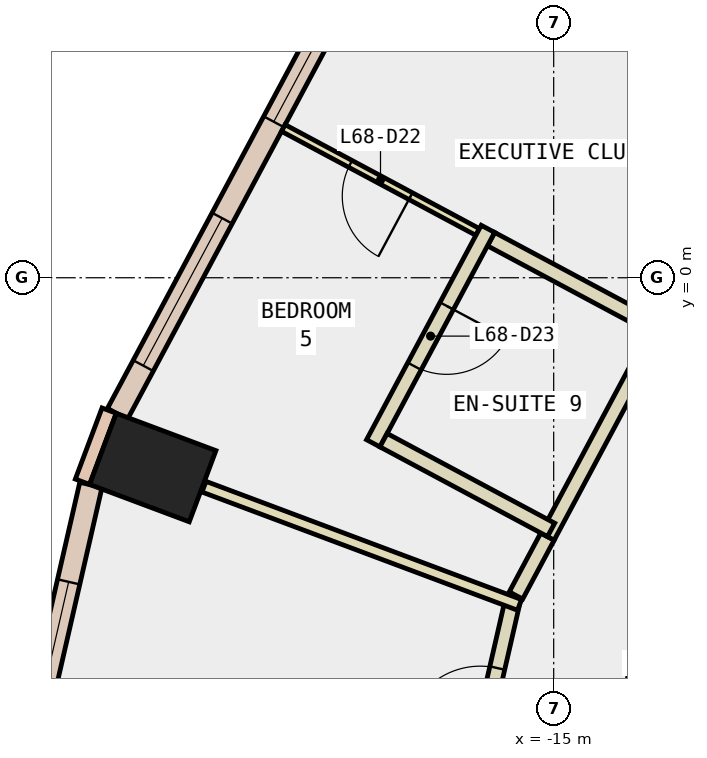
"""IFC4 building model, lengths in metres.
Left out: names, types, materials, properties, quantities, classifications, styles, units other than length and angle.
Written with IfcOpenShell. Run it as: python <this file> out.ifc"""

import sys

from ifc_helpers import new_model, si_unit, direction, frame, frame_2d, origin, origin_2d, place, context, subcontext, project, spatial, rectangle, extrude, element, fill, save


model = new_model("IFC4")
c1 = context("Model", 3, precision=1e-05, world=origin(), true_north=direction((0.0, 1.0)))
c2 = subcontext(c1, "Body", "Model", "MODEL_VIEW")
j1 = project(units=[si_unit("LENGTHUNIT", "METRE"), si_unit("PLANEANGLEUNIT", "RADIAN")], contexts=[c1])
p1 = place(None, origin())
s1 = spatial("IfcSite", under=j1, at=p1, CompositionType="ELEMENT")
p2 = place(p1, origin())
s2 = spatial("IfcBuilding", under=s1, at=p2, CompositionType="ELEMENT")
p3 = place(p2, frame((0.0, 0.0, 293.6)))
s3 = spatial("IfcBuildingStorey", under=s2, at=p3, CompositionType="ELEMENT", Elevation=293.6)
p4 = place(p3, frame((-20.275, -2.497, -0.34), z_axis=(0.0, 0.0, 1.0), x_axis=(0.3507141184, 0.93648257173, 0.0)))
e1 = element("IfcColumn", 1, at=p4, inside=s3, PredefinedType="COLUMN", context=c2, shape_type="SweptSolid", body=[
    extrude(rectangle(XDim=1.0, YDim=1.4, at=origin_2d()), origin(), (0.0, 0.0, 1.0), 3.6),
])
p5 = place(p3, frame((-6.279, -3.625, -0.34), z_axis=(0.0, 0.0, 1.0), x_axis=(-0.866017533419, -0.500013631625, 0.0)))
e2 = element("IfcWall", 2, at=p5, inside=s3, PredefinedType="SHEAR", context=c2, shape_type="SweptSolid", body=[
    extrude(rectangle(XDim=9.0, YDim=0.8, at=frame_2d((4.5, 0.0))), origin(), (0.0, 0.0, 1.0), 3.6),
])
p6 = place(p3, frame((-20.849, -1.748, 0.0), z_axis=(0.0, 0.0, 1.0), x_axis=(-0.350962844851, -0.936389385637, 0.0)))
e3 = element("IfcWall", 3, at=p6, inside=s3, PredefinedType="STANDARD", context=c2, shape_type="SweptSolid", body=[
    extrude(rectangle(XDim=1.0, YDim=0.2, at=frame_2d((0.5, 0.0))), origin(), (0.0, 0.0, 1.0), 3.26),
])
p7 = place(p3, frame((-17.306, 4.626, 0.0), z_axis=(0.0, 0.0, 1.0), x_axis=(-0.471789353675, -0.881711293882, 0.0)))
e4 = element("IfcWall", 4, at=p7, inside=s3, PredefinedType="STANDARD", context=c2, shape_type="SweptSolid", body=[
    extrude(rectangle(XDim=7.277, YDim=0.3, at=frame_2d((3.638, 0.0))), origin(), (0.0, 0.0, 1.0), 3.26),
])
p8 = place(p7, frame((0.719, 0.0, 0.9)))
e5 = element("IfcOpeningElement", 5, at=p8, cuts=e4, PredefinedType="OPENING", context=c2, shape_type="SweptSolid", body=[
    extrude(rectangle(XDim=2.2, YDim=2.0, at=frame_2d((1.1, 1.0))), frame((0.0, 0.16, 0.0), z_axis=(0.0, -1.0, 0.0), x_axis=(1.0, 0.0, 0.0)), (0.0, 0.0, 1.0), 0.32),
])
p9 = place(p7, frame((4.358, 0.0, 0.9)))
e6 = element("IfcOpeningElement", 6, at=p9, cuts=e4, PredefinedType="OPENING", context=c2, shape_type="SweptSolid", body=[
    extrude(rectangle(XDim=2.2, YDim=2.0, at=frame_2d((1.1, 1.0))), frame((0.0, 0.16, 0.0), z_axis=(0.0, -1.0, 0.0), x_axis=(1.0, 0.0, 0.0)), (0.0, 0.0, 1.0), 0.32),
])
p10 = place(p3, frame((-21.089, -2.725, 0.0), z_axis=(0.0, 0.0, 1.0), x_axis=(-0.223448307338, -0.974715781112, 0.0)))
e7 = element("IfcWall", 7, at=p10, inside=s3, PredefinedType="STANDARD", context=c2, shape_type="SweptSolid", body=[
    extrude(rectangle(XDim=4.019, YDim=0.3, at=frame_2d((2.009, 0.0))), origin(), (0.0, 0.0, 1.0), 3.26),
])
p11 = place(p10, frame((1.309, 0.0, 0.9)))
e8 = element("IfcOpeningElement", 8, at=p11, cuts=e7, PredefinedType="OPENING", context=c2, shape_type="SweptSolid", body=[
    extrude(rectangle(XDim=1.4, YDim=2.0, at=frame_2d((0.7, 1.0))), frame((0.0, 0.16, 0.0), z_axis=(0.0, -1.0, 0.0), x_axis=(1.0, 0.0, 0.0)), (0.0, 0.0, 1.0), 0.32),
])
p12 = place(p3, frame((-13.821, -4.808, 0.0), z_axis=(0.0, 0.0, 1.0), x_axis=(-0.223248099856, -0.97476165595, 0.0)))
e9 = element("IfcWall", 9, at=p12, inside=s3, PredefinedType="PARTITIONING", context=c2, shape_type="SweptSolid", body=[
    extrude(rectangle(XDim=2.302, YDim=0.2, at=frame_2d((1.151, 0.0))), origin(), (0.0, 0.0, 1.0), 3.26),
])
p13 = place(p3, frame((-15.496, -4.18, 0.0), z_axis=(0.0, 0.0, 1.0), x_axis=(0.471280380621, 0.881983448167, 0.0)))
e10 = element("IfcWall", 10, at=p13, inside=s3, PredefinedType="PARTITIONING", context=c2, shape_type="SweptSolid", body=[
    extrude(rectangle(XDim=0.879, YDim=0.2, at=frame_2d((0.439, 0.0))), origin(), (0.0, 0.0, 1.0), 3.26),
])
p14 = place(p3, frame((-15.082, -3.405, 0.0), z_axis=(0.0, 0.0, 1.0), x_axis=(0.471719946084, 0.88174842924, 0.0)))
e11 = element("IfcWall", 11, at=p14, inside=s3, PredefinedType="PARTITIONING", context=c2, shape_type="SweptSolid", body=[
    extrude(rectangle(XDim=3.0, YDim=0.2, at=frame_2d((1.5, 0.0))), origin(), (0.0, 0.0, 1.0), 3.26),
])
p15 = place(p3, frame((-16.192, -7.098, 0.0), z_axis=(0.0, 0.0, 1.0), x_axis=(0.22330023395, 0.974749714295, 0.0)))
e12 = element("IfcWall", 12, at=p15, inside=s3, PredefinedType="PARTITIONING", context=c2, shape_type="SweptSolid", body=[
    extrude(rectangle(XDim=2.928, YDim=0.2, at=frame_2d((1.464, 0.0))), origin(), (0.0, 0.0, 1.0), 3.26),
])
p16 = place(p15, frame((1.014, 0.0, 0.0)))
e13 = element("IfcOpeningElement", 13, at=p16, cuts=e12, PredefinedType="OPENING", context=c2, shape_type="SweptSolid", body=[
    extrude(rectangle(XDim=1.0, YDim=2.1, at=frame_2d((0.5, 1.05))), frame((0.0, 0.11, 0.0), z_axis=(0.0, -1.0, 0.0), x_axis=(1.0, 0.0, 0.0)), (0.0, 0.0, 1.0), 0.22),
])
p17 = place(p3, frame((-12.045, 2.272, 0.0), z_axis=(0.0, 0.0, 1.0), x_axis=(-0.873982340973, 0.485957680943, 0.0)))
e14 = element("IfcWall", 14, at=p17, inside=s3, PredefinedType="PARTITIONING", context=c2, shape_type="SweptSolid", body=[
    extrude(rectangle(XDim=4.28, YDim=0.15, at=frame_2d((2.14, 0.0))), origin(), (0.0, 0.0, 1.0), 3.26),
])
p18 = place(p3, frame((-16.0, 0.602, 0.0), z_axis=(0.0, 0.0, 1.0), x_axis=(-0.881743923375, 0.47172836844, 0.0)))
e15 = element("IfcWall", 15, at=p18, inside=s3, PredefinedType="PARTITIONING", context=c2, shape_type="SweptSolid", body=[
    extrude(rectangle(XDim=2.9, YDim=0.1, at=frame_2d((1.45, 0.0))), origin(), (0.0, 0.0, 1.0), 3.26),
])
p19 = place(p18, frame((1.0, 0.0, 0.0)))
e16 = element("IfcOpeningElement", 16, at=p19, cuts=e15, PredefinedType="OPENING", context=c2, shape_type="SweptSolid", body=[
    extrude(rectangle(XDim=0.9, YDim=2.1, at=frame_2d((0.45, 1.05))), frame((0.0, 0.06, 0.0), z_axis=(0.0, -1.0, 0.0), x_axis=(1.0, 0.0, 0.0)), (0.0, 0.0, 1.0), 0.12),
])
p20 = place(p3, frame((-13.707, -0.624, 0.0), z_axis=(0.0, 0.0, 1.0), x_axis=(-0.881825950813, 0.471575012562, 0.0)))
e17 = element("IfcWall", 17, at=p20, inside=s3, PredefinedType="PARTITIONING", context=c2, shape_type="SweptSolid", body=[
    extrude(rectangle(XDim=2.401, YDim=0.2, at=frame_2d((1.2, 0.0))), origin(), (0.0, 0.0, 1.0), 3.26),
])
p21 = place(p3, frame((-15.865, 0.643, 0.0), z_axis=(0.0, 0.0, 1.0), x_axis=(-0.471677088066, -0.881771356188, 0.0)))
e18 = element("IfcWall", 18, at=p21, inside=s3, PredefinedType="PARTITIONING", context=c2, shape_type="SweptSolid", body=[
    extrude(rectangle(XDim=3.199, YDim=0.2, at=frame_2d((1.6, 0.0))), origin(), (0.0, 0.0, 1.0), 3.26),
])
p22 = place(p21, frame((1.15, 0.0, 0.0)))
e19 = element("IfcOpeningElement", 19, at=p22, cuts=e18, PredefinedType="OPENING", context=c2, shape_type="SweptSolid", body=[
    extrude(rectangle(XDim=0.9, YDim=2.1, at=frame_2d((0.45, 1.05))), frame((0.0, 0.11, 0.0), z_axis=(0.0, -1.0, 0.0), x_axis=(1.0, 0.0, 0.0)), (0.0, 0.0, 1.0), 0.22),
])
p23 = place(p3, frame((-17.239, -2.137, 0.0), z_axis=(0.0, 0.0, 1.0), x_axis=(0.881706262609, -0.471798756332, 0.0)))
e20 = element("IfcWall", 20, at=p23, inside=s3, PredefinedType="PARTITIONING", context=c2, shape_type="SweptSolid", body=[
    extrude(rectangle(XDim=2.501, YDim=0.2, at=frame_2d((1.25, 0.0))), origin(), (0.0, 0.0, 1.0), 3.26),
])
p24 = place(p3, frame((-15.45, -4.304, 0.0), z_axis=(0.0, 0.0, 1.0), x_axis=(-0.936458128132, 0.350779381172, 0.0)))
e21 = element("IfcWall", 21, at=p24, inside=s3, PredefinedType="PARTITIONING", context=c2, shape_type="SweptSolid", body=[
    extrude(rectangle(XDim=4.433, YDim=0.15, at=frame_2d((2.216, 0.0))), origin(), (0.0, 0.0, 1.0), 3.26),
])
p25 = place(p8, origin())
e22 = element("IfcWindow", 22, at=p25, inside=s3, PartitioningType="SINGLE_PANEL", PredefinedType="WINDOW", context=c2, shape_type="SweptSolid", body=[
    extrude(rectangle(XDim=2.2, YDim=2.0, at=frame_2d((1.1, 1.0))), frame((0.0, 0.03, 0.0), z_axis=(0.0, -1.0, 0.0), x_axis=(1.0, 0.0, 0.0)), (0.0, 0.0, 1.0), 0.06),
])
fill(e5, e22)
p26 = place(p9, origin())
e23 = element("IfcWindow", 23, at=p26, inside=s3, PartitioningType="SINGLE_PANEL", PredefinedType="WINDOW", context=c2, shape_type="SweptSolid", body=[
    extrude(rectangle(XDim=2.2, YDim=2.0, at=frame_2d((1.1, 1.0))), frame((0.0, 0.03, 0.0), z_axis=(0.0, -1.0, 0.0), x_axis=(1.0, 0.0, 0.0)), (0.0, 0.0, 1.0), 0.06),
])
fill(e6, e23)
p27 = place(p11, origin())
e24 = element("IfcWindow", 24, at=p27, inside=s3, PartitioningType="SINGLE_PANEL", PredefinedType="WINDOW", context=c2, shape_type="SweptSolid", body=[
    extrude(rectangle(XDim=1.4, YDim=2.0, at=frame_2d((0.7, 1.0))), frame((0.0, 0.03, 0.0), z_axis=(0.0, -1.0, 0.0), x_axis=(1.0, 0.0, 0.0)), (0.0, 0.0, 1.0), 0.06),
])
fill(e8, e24)
p28 = place(p19, origin())
e25 = element("IfcDoor", 25, at=p28, inside=s3, OperationType="SINGLE_SWING_LEFT", PredefinedType="DOOR", context=c2, shape_type="SweptSolid", body=[
    extrude(rectangle(XDim=0.9, YDim=2.1, at=frame_2d((0.45, 1.05))), frame((0.0, 0.025, 0.0), z_axis=(0.0, -1.0, 0.0), x_axis=(1.0, 0.0, 0.0)), (0.0, 0.0, 1.0), 0.05),
])
fill(e16, e25)
p29 = place(p22, origin())
e26 = element("IfcDoor", 26, at=p29, inside=s3, OperationType="SINGLE_SWING_LEFT", PredefinedType="DOOR", context=c2, shape_type="SweptSolid", body=[
    extrude(rectangle(XDim=0.9, YDim=2.1, at=frame_2d((0.45, 1.05))), frame((0.0, 0.025, 0.0), z_axis=(0.0, -1.0, 0.0), x_axis=(1.0, 0.0, 0.0)), (0.0, 0.0, 1.0), 0.05),
])
fill(e19, e26)
p30 = place(p16, origin())
e27 = element("IfcDoor", 27, at=p30, inside=s3, OperationType="SINGLE_SWING_LEFT", PredefinedType="DOOR", context=c2, shape_type="SweptSolid", body=[
    extrude(rectangle(XDim=1.0, YDim=2.1, at=frame_2d((0.5, 1.05))), frame((0.0, 0.025, 0.0), z_axis=(0.0, -1.0, 0.0), x_axis=(1.0, 0.0, 0.0)), (0.0, 0.0, 1.0), 0.05),
])
fill(e13, e27)
save(model, sys.argv[1])
